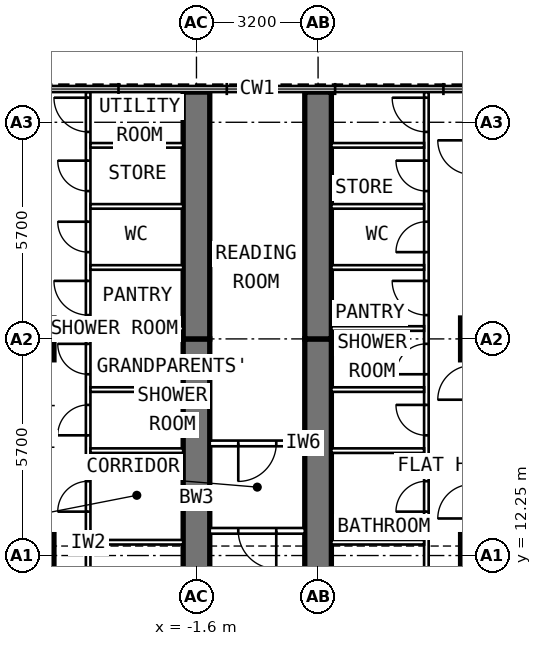
"""IFC4 building model, lengths in metres.
Left out: names, types, materials, properties, quantities, classifications, styles, units other than length and angle.
Written with IfcOpenShell. Run it as: python <this file> out.ifc"""

import sys

from ifc_helpers import new_model, si_unit, direction, frame, frame_2d, origin, origin_2d, place, context, subcontext, project, spatial, rectangle, extrude, element, fill, save


model = new_model("IFC4")
c1 = context("Model", 3, precision=1e-05, world=origin(), true_north=direction((0.0, 1.0)))
c2 = subcontext(c1, "Body", "Model", "MODEL_VIEW")
j1 = project(units=[si_unit("LENGTHUNIT", "METRE"), si_unit("PLANEANGLEUNIT", "RADIAN")], contexts=[c1])
p1 = place(None, origin())
s1 = spatial("IfcSite", under=j1, at=p1, CompositionType="ELEMENT")
p2 = place(p1, origin())
s2 = spatial("IfcBuilding", under=s1, at=p2, CompositionType="ELEMENT")
p3 = place(p2, frame((0.0, 0.0, 238.8)))
s3 = spatial("IfcBuildingStorey", under=s2, at=p3, CompositionType="ELEMENT", Elevation=238.8)
for number, where, z_axis, x_axis in (
    (1, (-5.9, 12.25, 0.0), (0.0, 0.0, 1.0), (0.0, 1.0, 0.0)),
    (2, (-5.9, 17.95, 0.0), (0.0, 0.0, 1.0), (0.0, 1.0, 0.0)),
    (3, (5.9, 12.25, 0.0), (0.0, 0.0, 1.0), (0.0, 1.0, 0.0)),
    (4, (5.9, 17.95, 0.0), (0.0, 0.0, 1.0), (0.0, 1.0, 0.0)),
):
    element("IfcColumn", number, at=place(p3, frame(where, z_axis=z_axis, x_axis=x_axis)), inside=s3, PredefinedType="COLUMN", context=c2, shape_type="SweptSolid", body=[
        extrude(rectangle(XDim=1.1, YDim=1.1, at=origin_2d()), origin(), (0.0, 0.0, 1.0), 3.6),
    ])
p4 = place(p3, frame((-1.6, 9.6, 0.0), z_axis=(0.0, 0.0, 1.0), x_axis=(0.0, 1.0, 0.0)))
e5 = element("IfcWall", 5, at=p4, inside=s3, PredefinedType="SHEAR", context=c2, shape_type="SweptSolid", body=[
    extrude(rectangle(XDim=8.35, YDim=0.7, at=frame_2d((4.175, 0.0))), origin(), (0.0, 0.0, 1.0), 3.6),
])
p5 = place(p4, frame((1.3, 0.0, 0.0)))
e6 = element("IfcOpeningElement", 6, at=p5, cuts=e5, PredefinedType="OPENING", context=c2, shape_type="SweptSolid", body=[
    extrude(rectangle(XDim=1.0, YDim=2.1, at=frame_2d((0.5, 1.05))), frame((0.0, 0.362, 0.0), z_axis=(0.0, -1.0, 0.0), x_axis=(1.0, 0.0, 0.0)), (0.0, 0.0, 1.0), 0.724),
])
p6 = place(p3, frame((-1.6, 17.95, 0.0), z_axis=(0.0, 0.0, 1.0), x_axis=(0.0, 1.0, 0.0)))
e7 = element("IfcWall", 7, at=p6, inside=s3, PredefinedType="SHEAR", context=c2, shape_type="SweptSolid", body=[
    extrude(rectangle(XDim=6.495, YDim=0.7, at=frame_2d((3.248, 0.0))), origin(), (0.0, 0.0, 1.0), 3.6),
])
p7 = place(p3, frame((1.6, 9.6, 0.0), z_axis=(0.0, 0.0, 1.0), x_axis=(0.0, 1.0, 0.0)))
e8 = element("IfcWall", 8, at=p7, inside=s3, PredefinedType="SHEAR", context=c2, shape_type="SweptSolid", body=[
    extrude(rectangle(XDim=8.35, YDim=0.7, at=frame_2d((4.175, 0.0))), origin(), (0.0, 0.0, 1.0), 3.6),
])
p8 = place(p7, frame((1.3, 0.0, 0.0)))
e9 = element("IfcOpeningElement", 9, at=p8, cuts=e8, PredefinedType="OPENING", context=c2, shape_type="SweptSolid", body=[
    extrude(rectangle(XDim=1.0, YDim=2.1, at=frame_2d((0.5, 1.05))), frame((0.0, 0.362, 0.0), z_axis=(0.0, -1.0, 0.0), x_axis=(1.0, 0.0, 0.0)), (0.0, 0.0, 1.0), 0.724),
])
p9 = place(p3, frame((1.6, 17.95, 0.0), z_axis=(0.0, 0.0, 1.0), x_axis=(0.0, 1.0, 0.0)))
e10 = element("IfcWall", 10, at=p9, inside=s3, PredefinedType="SHEAR", context=c2, shape_type="SweptSolid", body=[
    extrude(rectangle(XDim=6.495, YDim=0.7, at=frame_2d((3.248, 0.0))), origin(), (0.0, 0.0, 1.0), 3.6),
])
p10 = place(p3, frame((-4.45, 9.9, 0.0), z_axis=(0.0, 0.0, 1.0), x_axis=(0.0, 1.0, 0.0)))
e11 = element("IfcWall", 11, at=p10, inside=s3, PredefinedType="PARTITIONING", context=c2, shape_type="SweptSolid", body=[
    extrude(rectangle(XDim=14.545, YDim=0.12, at=frame_2d((7.272, 0.0))), origin(), (0.0, 0.0, 1.0), 3.35),
])
p11 = place(p10, frame((0.95, 0.0, 0.0)))
e12 = element("IfcOpeningElement", 12, at=p11, cuts=e11, PredefinedType="OPENING", context=c2, shape_type="SweptSolid", body=[
    extrude(rectangle(XDim=0.9, YDim=2.1, at=frame_2d((0.45, 1.05))), frame((0.0, 0.072, 0.0), z_axis=(0.0, -1.0, 0.0), x_axis=(1.0, 0.0, 0.0)), (0.0, 0.0, 1.0), 0.144),
])
p12 = place(p10, frame((3.505, 0.0, 0.0)))
e13 = element("IfcOpeningElement", 13, at=p12, cuts=e11, PredefinedType="OPENING", context=c2, shape_type="SweptSolid", body=[
    extrude(rectangle(XDim=0.8, YDim=2.1, at=frame_2d((0.4, 1.05))), frame((0.0, 0.072, 0.0), z_axis=(0.0, -1.0, 0.0), x_axis=(1.0, 0.0, 0.0)), (0.0, 0.0, 1.0), 0.144),
])
p13 = place(p10, frame((5.513, 0.0, 0.0)))
e14 = element("IfcOpeningElement", 14, at=p13, cuts=e11, PredefinedType="OPENING", context=c2, shape_type="SweptSolid", body=[
    extrude(rectangle(XDim=0.8, YDim=2.1, at=frame_2d((0.4, 1.05))), frame((0.0, 0.072, 0.0), z_axis=(0.0, -1.0, 0.0), x_axis=(1.0, 0.0, 0.0)), (0.0, 0.0, 1.0), 0.144),
])
p14 = place(p10, frame((7.12, 0.0, 0.0)))
e15 = element("IfcOpeningElement", 15, at=p14, cuts=e11, PredefinedType="OPENING", context=c2, shape_type="SweptSolid", body=[
    extrude(rectangle(XDim=0.8, YDim=2.1, at=frame_2d((0.4, 1.05))), frame((0.0, 0.072, 0.0), z_axis=(0.0, -1.0, 0.0), x_axis=(1.0, 0.0, 0.0)), (0.0, 0.0, 1.0), 0.144),
])
p15 = place(p10, frame((8.677, 0.0, 0.0)))
e16 = element("IfcOpeningElement", 16, at=p15, cuts=e11, PredefinedType="OPENING", context=c2, shape_type="SweptSolid", body=[
    extrude(rectangle(XDim=0.9, YDim=2.1, at=frame_2d((0.45, 1.05))), frame((0.0, 0.072, 0.0), z_axis=(0.0, -1.0, 0.0), x_axis=(1.0, 0.0, 0.0)), (0.0, 0.0, 1.0), 0.144),
])
p16 = place(p10, frame((10.333, 0.0, 0.0)))
e17 = element("IfcOpeningElement", 17, at=p16, cuts=e11, PredefinedType="OPENING", context=c2, shape_type="SweptSolid", body=[
    extrude(rectangle(XDim=0.8, YDim=2.1, at=frame_2d((0.4, 1.05))), frame((0.0, 0.072, 0.0), z_axis=(0.0, -1.0, 0.0), x_axis=(1.0, 0.0, 0.0)), (0.0, 0.0, 1.0), 0.144),
])
p17 = place(p10, frame((11.94, 0.0, 0.0)))
e18 = element("IfcOpeningElement", 18, at=p17, cuts=e11, PredefinedType="OPENING", context=c2, shape_type="SweptSolid", body=[
    extrude(rectangle(XDim=0.8, YDim=2.1, at=frame_2d((0.4, 1.05))), frame((0.0, 0.072, 0.0), z_axis=(0.0, -1.0, 0.0), x_axis=(1.0, 0.0, 0.0)), (0.0, 0.0, 1.0), 0.144),
])
p18 = place(p10, frame((13.497, 0.0, 0.0)))
e19 = element("IfcOpeningElement", 19, at=p18, cuts=e11, PredefinedType="OPENING", context=c2, shape_type="SweptSolid", body=[
    extrude(rectangle(XDim=0.9, YDim=2.1, at=frame_2d((0.45, 1.05))), frame((0.0, 0.072, 0.0), z_axis=(0.0, -1.0, 0.0), x_axis=(1.0, 0.0, 0.0)), (0.0, 0.0, 1.0), 0.144),
])
p19 = place(p3, frame((-1.95, 12.6, 0.0), z_axis=(0.0, 0.0, 1.0), x_axis=(-1.0, 0.0, 0.0)))
e20 = element("IfcWall", 20, at=p19, inside=s3, PredefinedType="PARTITIONING", context=c2, shape_type="SweptSolid", body=[
    extrude(rectangle(XDim=2.44, YDim=0.12, at=frame_2d((1.22, 0.0))), origin(), (0.0, 0.0, 1.0), 2.45),
])
for number, where, z_axis, x_axis in (
    (21, (-1.95, 15.01, 0.0), (0.0, 0.0, 1.0), (-1.0, 0.0, 0.0)),
    (22, (-1.95, 16.617, 0.0), (0.0, 0.0, 1.0), (-1.0, 0.0, 0.0)),
):
    element("IfcWall", number, at=place(p3, frame(where, z_axis=z_axis, x_axis=x_axis)), inside=s3, PredefinedType="PARTITIONING", context=c2, shape_type="SweptSolid", body=[
        extrude(rectangle(XDim=2.44, YDim=0.12, at=frame_2d((1.22, 0.0))), origin(), (0.0, 0.0, 1.0), 3.35),
    ])
p20 = place(p3, frame((-1.95, 18.223, 0.0), z_axis=(0.0, 0.0, 1.0), x_axis=(-1.0, 0.0, 0.0)))
e23 = element("IfcWall", 23, at=p20, inside=s3, PredefinedType="PARTITIONING", context=c2, shape_type="SweptSolid", body=[
    extrude(rectangle(XDim=2.44, YDim=0.12, at=frame_2d((1.22, 0.0))), origin(), (0.0, 0.0, 1.0), 2.45),
])
for number, where, z_axis, x_axis in (
    (24, (-1.95, 19.83, 0.0), (0.0, 0.0, 1.0), (-1.0, 0.0, 0.0)),
    (25, (-1.95, 21.437, 0.0), (0.0, 0.0, 1.0), (-1.0, 0.0, 0.0)),
    (26, (-1.95, 23.043, 0.0), (0.0, 0.0, 1.0), (-1.0, 0.0, 0.0)),
):
    element("IfcWall", number, at=place(p3, frame(where, z_axis=z_axis, x_axis=x_axis)), inside=s3, PredefinedType="PARTITIONING", context=c2, shape_type="SweptSolid", body=[
        extrude(rectangle(XDim=2.44, YDim=0.12, at=frame_2d((1.22, 0.0))), origin(), (0.0, 0.0, 1.0), 3.35),
    ])
p21 = place(p3, frame((4.45, 9.9, 0.0), z_axis=(0.0, 0.0, 1.0), x_axis=(0.0, 1.0, 0.0)))
e27 = element("IfcWall", 27, at=p21, inside=s3, PredefinedType="PARTITIONING", context=c2, shape_type="SweptSolid", body=[
    extrude(rectangle(XDim=14.545, YDim=0.12, at=frame_2d((7.272, 0.0))), origin(), (0.0, 0.0, 1.0), 3.35),
])
p22 = place(p21, frame((0.95, 0.0, 0.0)))
e28 = element("IfcOpeningElement", 28, at=p22, cuts=e27, PredefinedType="OPENING", context=c2, shape_type="SweptSolid", body=[
    extrude(rectangle(XDim=0.9, YDim=2.1, at=frame_2d((0.45, 1.05))), frame((0.0, 0.072, 0.0), z_axis=(0.0, -1.0, 0.0), x_axis=(1.0, 0.0, 0.0)), (0.0, 0.0, 1.0), 0.144),
])
p23 = place(p21, frame((3.505, 0.0, 0.0)))
e29 = element("IfcOpeningElement", 29, at=p23, cuts=e27, PredefinedType="OPENING", context=c2, shape_type="SweptSolid", body=[
    extrude(rectangle(XDim=0.8, YDim=2.1, at=frame_2d((0.4, 1.05))), frame((0.0, 0.072, 0.0), z_axis=(0.0, -1.0, 0.0), x_axis=(1.0, 0.0, 0.0)), (0.0, 0.0, 1.0), 0.144),
])
p24 = place(p21, frame((5.513, 0.0, 0.0)))
e30 = element("IfcOpeningElement", 30, at=p24, cuts=e27, PredefinedType="OPENING", context=c2, shape_type="SweptSolid", body=[
    extrude(rectangle(XDim=0.8, YDim=2.1, at=frame_2d((0.4, 1.05))), frame((0.0, 0.072, 0.0), z_axis=(0.0, -1.0, 0.0), x_axis=(1.0, 0.0, 0.0)), (0.0, 0.0, 1.0), 0.144),
])
p25 = place(p21, frame((7.12, 0.0, 0.0)))
e31 = element("IfcOpeningElement", 31, at=p25, cuts=e27, PredefinedType="OPENING", context=c2, shape_type="SweptSolid", body=[
    extrude(rectangle(XDim=0.8, YDim=2.1, at=frame_2d((0.4, 1.05))), frame((0.0, 0.072, 0.0), z_axis=(0.0, -1.0, 0.0), x_axis=(1.0, 0.0, 0.0)), (0.0, 0.0, 1.0), 0.144),
])
p26 = place(p21, frame((8.677, 0.0, 0.0)))
e32 = element("IfcOpeningElement", 32, at=p26, cuts=e27, PredefinedType="OPENING", context=c2, shape_type="SweptSolid", body=[
    extrude(rectangle(XDim=0.9, YDim=2.1, at=frame_2d((0.45, 1.05))), frame((0.0, 0.072, 0.0), z_axis=(0.0, -1.0, 0.0), x_axis=(1.0, 0.0, 0.0)), (0.0, 0.0, 1.0), 0.144),
])
p27 = place(p21, frame((10.333, 0.0, 0.0)))
e33 = element("IfcOpeningElement", 33, at=p27, cuts=e27, PredefinedType="OPENING", context=c2, shape_type="SweptSolid", body=[
    extrude(rectangle(XDim=0.8, YDim=2.1, at=frame_2d((0.4, 1.05))), frame((0.0, 0.072, 0.0), z_axis=(0.0, -1.0, 0.0), x_axis=(1.0, 0.0, 0.0)), (0.0, 0.0, 1.0), 0.144),
])
p28 = place(p21, frame((11.94, 0.0, 0.0)))
e34 = element("IfcOpeningElement", 34, at=p28, cuts=e27, PredefinedType="OPENING", context=c2, shape_type="SweptSolid", body=[
    extrude(rectangle(XDim=0.8, YDim=2.1, at=frame_2d((0.4, 1.05))), frame((0.0, 0.072, 0.0), z_axis=(0.0, -1.0, 0.0), x_axis=(1.0, 0.0, 0.0)), (0.0, 0.0, 1.0), 0.144),
])
p29 = place(p21, frame((13.497, 0.0, 0.0)))
e35 = element("IfcOpeningElement", 35, at=p29, cuts=e27, PredefinedType="OPENING", context=c2, shape_type="SweptSolid", body=[
    extrude(rectangle(XDim=0.9, YDim=2.1, at=frame_2d((0.45, 1.05))), frame((0.0, 0.072, 0.0), z_axis=(0.0, -1.0, 0.0), x_axis=(1.0, 0.0, 0.0)), (0.0, 0.0, 1.0), 0.144),
])
p30 = place(p3, frame((1.95, 12.6, 0.0), z_axis=(0.0, 0.0, 1.0), x_axis=(1.0, 0.0, 0.0)))
e36 = element("IfcWall", 36, at=p30, inside=s3, PredefinedType="PARTITIONING", context=c2, shape_type="SweptSolid", body=[
    extrude(rectangle(XDim=2.44, YDim=0.12, at=frame_2d((1.22, 0.0))), origin(), (0.0, 0.0, 1.0), 2.45),
])
for number, where, z_axis, x_axis in (
    (37, (1.95, 15.01, 0.0), (0.0, 0.0, 1.0), (1.0, 0.0, 0.0)),
    (38, (1.95, 16.617, 0.0), (0.0, 0.0, 1.0), (1.0, 0.0, 0.0)),
):
    element("IfcWall", number, at=place(p3, frame(where, z_axis=z_axis, x_axis=x_axis)), inside=s3, PredefinedType="PARTITIONING", context=c2, shape_type="SweptSolid", body=[
        extrude(rectangle(XDim=2.44, YDim=0.12, at=frame_2d((1.22, 0.0))), origin(), (0.0, 0.0, 1.0), 3.35),
    ])
p31 = place(p3, frame((1.95, 18.223, 0.0), z_axis=(0.0, 0.0, 1.0), x_axis=(1.0, 0.0, 0.0)))
e39 = element("IfcWall", 39, at=p31, inside=s3, PredefinedType="PARTITIONING", context=c2, shape_type="SweptSolid", body=[
    extrude(rectangle(XDim=2.44, YDim=0.12, at=frame_2d((1.22, 0.0))), origin(), (0.0, 0.0, 1.0), 2.45),
])
for number, where, z_axis, x_axis in (
    (40, (1.95, 19.83, 0.0), (0.0, 0.0, 1.0), (1.0, 0.0, 0.0)),
    (41, (1.95, 21.437, 0.0), (0.0, 0.0, 1.0), (1.0, 0.0, 0.0)),
    (42, (1.95, 23.043, 0.0), (0.0, 0.0, 1.0), (1.0, 0.0, 0.0)),
):
    element("IfcWall", number, at=place(p3, frame(where, z_axis=z_axis, x_axis=x_axis)), inside=s3, PredefinedType="PARTITIONING", context=c2, shape_type="SweptSolid", body=[
        extrude(rectangle(XDim=2.44, YDim=0.12, at=frame_2d((1.22, 0.0))), origin(), (0.0, 0.0, 1.0), 3.35),
    ])
p32 = place(p3, frame((1.25, 15.2, 0.0), z_axis=(0.0, 0.0, 1.0), x_axis=(-1.0, 0.0, 0.0)))
e43 = element("IfcWall", 43, at=p32, inside=s3, PredefinedType="PARTITIONING", context=c2, shape_type="SweptSolid", body=[
    extrude(rectangle(XDim=2.5, YDim=0.15, at=frame_2d((1.25, 0.0))), origin(), (0.0, 0.0, 1.0), 3.35),
])
p33 = place(p32, frame((0.75, 0.0, 0.0)))
e44 = element("IfcOpeningElement", 44, at=p33, cuts=e43, PredefinedType="OPENING", context=c2, shape_type="SweptSolid", body=[
    extrude(rectangle(XDim=1.0, YDim=2.1, at=frame_2d((0.5, 1.05))), frame((0.0, 0.087, 0.0), z_axis=(0.0, -1.0, 0.0), x_axis=(1.0, 0.0, 0.0)), (0.0, 0.0, 1.0), 0.174),
])
p34 = place(p3, frame((1.25, 12.9, 0.0), z_axis=(0.0, 0.0, 1.0), x_axis=(-1.0, 0.0, 0.0)))
e45 = element("IfcWall", 45, at=p34, inside=s3, PredefinedType="PARTITIONING", context=c2, shape_type="SweptSolid", body=[
    extrude(rectangle(XDim=2.5, YDim=0.15, at=frame_2d((1.25, 0.0))), origin(), (0.0, 0.0, 1.0), 3.35),
])
p35 = place(p34, frame((0.75, 0.0, 0.0)))
e46 = element("IfcOpeningElement", 46, at=p35, cuts=e45, PredefinedType="OPENING", context=c2, shape_type="SweptSolid", body=[
    extrude(rectangle(XDim=1.0, YDim=2.1, at=frame_2d((0.5, 1.05))), frame((0.0, 0.087, 0.0), z_axis=(0.0, -1.0, 0.0), x_axis=(1.0, 0.0, 0.0)), (0.0, 0.0, 1.0), 0.174),
])
p36 = place(p12, origin())
e47 = element("IfcDoor", 47, at=p36, inside=s3, OperationType="SINGLE_SWING_LEFT", PredefinedType="DOOR", context=c2, shape_type="SweptSolid", body=[
    extrude(rectangle(XDim=0.8, YDim=2.1, at=frame_2d((0.4, 1.05))), frame((0.0, 0.025, 0.0), z_axis=(0.0, -1.0, 0.0), x_axis=(1.0, 0.0, 0.0)), (0.0, 0.0, 1.0), 0.05),
])
fill(e13, e47)
p37 = place(p13, origin())
e48 = element("IfcDoor", 48, at=p37, inside=s3, OperationType="SINGLE_SWING_LEFT", PredefinedType="DOOR", context=c2, shape_type="SweptSolid", body=[
    extrude(rectangle(XDim=0.8, YDim=2.1, at=frame_2d((0.4, 1.05))), frame((0.0, 0.025, 0.0), z_axis=(0.0, -1.0, 0.0), x_axis=(1.0, 0.0, 0.0)), (0.0, 0.0, 1.0), 0.05),
])
fill(e14, e48)
p38 = place(p14, origin())
e49 = element("IfcDoor", 49, at=p38, inside=s3, OperationType="SINGLE_SWING_RIGHT", PredefinedType="DOOR", context=c2, shape_type="SweptSolid", body=[
    extrude(rectangle(XDim=0.8, YDim=2.1, at=frame_2d((0.4, 1.05))), frame((0.0, 0.025, 0.0), z_axis=(0.0, -1.0, 0.0), x_axis=(1.0, 0.0, 0.0)), (0.0, 0.0, 1.0), 0.05),
])
fill(e15, e49)
p39 = place(p15, origin())
e50 = element("IfcDoor", 50, at=p39, inside=s3, OperationType="SINGLE_SWING_RIGHT", PredefinedType="DOOR", context=c2, shape_type="SweptSolid", body=[
    extrude(rectangle(XDim=0.9, YDim=2.1, at=frame_2d((0.45, 1.05))), frame((0.0, 0.025, 0.0), z_axis=(0.0, -1.0, 0.0), x_axis=(1.0, 0.0, 0.0)), (0.0, 0.0, 1.0), 0.05),
])
fill(e16, e50)
p40 = place(p16, origin())
e51 = element("IfcDoor", 51, at=p40, inside=s3, OperationType="SINGLE_SWING_RIGHT", PredefinedType="DOOR", context=c2, shape_type="SweptSolid", body=[
    extrude(rectangle(XDim=0.8, YDim=2.1, at=frame_2d((0.4, 1.05))), frame((0.0, 0.025, 0.0), z_axis=(0.0, -1.0, 0.0), x_axis=(1.0, 0.0, 0.0)), (0.0, 0.0, 1.0), 0.05),
])
fill(e17, e51)
p41 = place(p17, origin())
e52 = element("IfcDoor", 52, at=p41, inside=s3, OperationType="SINGLE_SWING_RIGHT", PredefinedType="DOOR", context=c2, shape_type="SweptSolid", body=[
    extrude(rectangle(XDim=0.8, YDim=2.1, at=frame_2d((0.4, 1.05))), frame((0.0, 0.025, 0.0), z_axis=(0.0, -1.0, 0.0), x_axis=(1.0, 0.0, 0.0)), (0.0, 0.0, 1.0), 0.05),
])
fill(e18, e52)
p42 = place(p18, origin())
e53 = element("IfcDoor", 53, at=p42, inside=s3, OperationType="SINGLE_SWING_RIGHT", PredefinedType="DOOR", context=c2, shape_type="SweptSolid", body=[
    extrude(rectangle(XDim=0.9, YDim=2.1, at=frame_2d((0.45, 1.05))), frame((0.0, 0.025, 0.0), z_axis=(0.0, -1.0, 0.0), x_axis=(1.0, 0.0, 0.0)), (0.0, 0.0, 1.0), 0.05),
])
fill(e19, e53)
p43 = place(p23, origin())
e54 = element("IfcDoor", 54, at=p43, inside=s3, OperationType="SINGLE_SWING_LEFT", PredefinedType="DOOR", context=c2, shape_type="SweptSolid", body=[
    extrude(rectangle(XDim=0.8, YDim=2.1, at=frame_2d((0.4, 1.05))), frame((0.0, 0.025, 0.0), z_axis=(0.0, -1.0, 0.0), x_axis=(1.0, 0.0, 0.0)), (0.0, 0.0, 1.0), 0.05),
])
fill(e29, e54)
p44 = place(p24, origin())
e55 = element("IfcDoor", 55, at=p44, inside=s3, OperationType="SINGLE_SWING_RIGHT", PredefinedType="DOOR", context=c2, shape_type="SweptSolid", body=[
    extrude(rectangle(XDim=0.8, YDim=2.1, at=frame_2d((0.4, 1.05))), frame((0.0, 0.025, 0.0), z_axis=(0.0, -1.0, 0.0), x_axis=(1.0, 0.0, 0.0)), (0.0, 0.0, 1.0), 0.05),
])
fill(e30, e55)
p45 = place(p25, origin())
e56 = element("IfcDoor", 56, at=p45, inside=s3, OperationType="SINGLE_SWING_LEFT", PredefinedType="DOOR", context=c2, shape_type="SweptSolid", body=[
    extrude(rectangle(XDim=0.8, YDim=2.1, at=frame_2d((0.4, 1.05))), frame((0.0, 0.025, 0.0), z_axis=(0.0, -1.0, 0.0), x_axis=(1.0, 0.0, 0.0)), (0.0, 0.0, 1.0), 0.05),
])
fill(e31, e56)
p46 = place(p26, origin())
e57 = element("IfcDoor", 57, at=p46, inside=s3, OperationType="SINGLE_SWING_RIGHT", PredefinedType="DOOR", context=c2, shape_type="SweptSolid", body=[
    extrude(rectangle(XDim=0.9, YDim=2.1, at=frame_2d((0.45, 1.05))), frame((0.0, 0.025, 0.0), z_axis=(0.0, -1.0, 0.0), x_axis=(1.0, 0.0, 0.0)), (0.0, 0.0, 1.0), 0.05),
])
fill(e32, e57)
p47 = place(p27, origin())
e58 = element("IfcDoor", 58, at=p47, inside=s3, OperationType="SINGLE_SWING_LEFT", PredefinedType="DOOR", context=c2, shape_type="SweptSolid", body=[
    extrude(rectangle(XDim=0.8, YDim=2.1, at=frame_2d((0.4, 1.05))), frame((0.0, 0.025, 0.0), z_axis=(0.0, -1.0, 0.0), x_axis=(1.0, 0.0, 0.0)), (0.0, 0.0, 1.0), 0.05),
])
fill(e33, e58)
p48 = place(p28, origin())
e59 = element("IfcDoor", 59, at=p48, inside=s3, OperationType="SINGLE_SWING_RIGHT", PredefinedType="DOOR", context=c2, shape_type="SweptSolid", body=[
    extrude(rectangle(XDim=0.8, YDim=2.1, at=frame_2d((0.4, 1.05))), frame((0.0, 0.025, 0.0), z_axis=(0.0, -1.0, 0.0), x_axis=(1.0, 0.0, 0.0)), (0.0, 0.0, 1.0), 0.05),
])
fill(e34, e59)
p49 = place(p29, origin())
e60 = element("IfcDoor", 60, at=p49, inside=s3, OperationType="SINGLE_SWING_RIGHT", PredefinedType="DOOR", context=c2, shape_type="SweptSolid", body=[
    extrude(rectangle(XDim=0.9, YDim=2.1, at=frame_2d((0.45, 1.05))), frame((0.0, 0.025, 0.0), z_axis=(0.0, -1.0, 0.0), x_axis=(1.0, 0.0, 0.0)), (0.0, 0.0, 1.0), 0.05),
])
fill(e35, e60)
p50 = place(p33, origin())
e61 = element("IfcDoor", 61, at=p50, inside=s3, OperationType="SINGLE_SWING_RIGHT", PredefinedType="DOOR", context=c2, shape_type="SweptSolid", body=[
    extrude(rectangle(XDim=1.0, YDim=2.1, at=frame_2d((0.5, 1.05))), frame((0.0, 0.025, 0.0), z_axis=(0.0, -1.0, 0.0), x_axis=(1.0, 0.0, 0.0)), (0.0, 0.0, 1.0), 0.05),
])
fill(e44, e61)
p51 = place(p35, origin())
e62 = element("IfcDoor", 62, at=p51, inside=s3, OperationType="SINGLE_SWING_LEFT", PredefinedType="DOOR", context=c2, shape_type="SweptSolid", body=[
    extrude(rectangle(XDim=1.0, YDim=2.1, at=frame_2d((0.5, 1.05))), frame((0.0, 0.025, 0.0), z_axis=(0.0, -1.0, 0.0), x_axis=(1.0, 0.0, 0.0)), (0.0, 0.0, 1.0), 0.05),
])
fill(e46, e62)
save(model, sys.argv[1])
